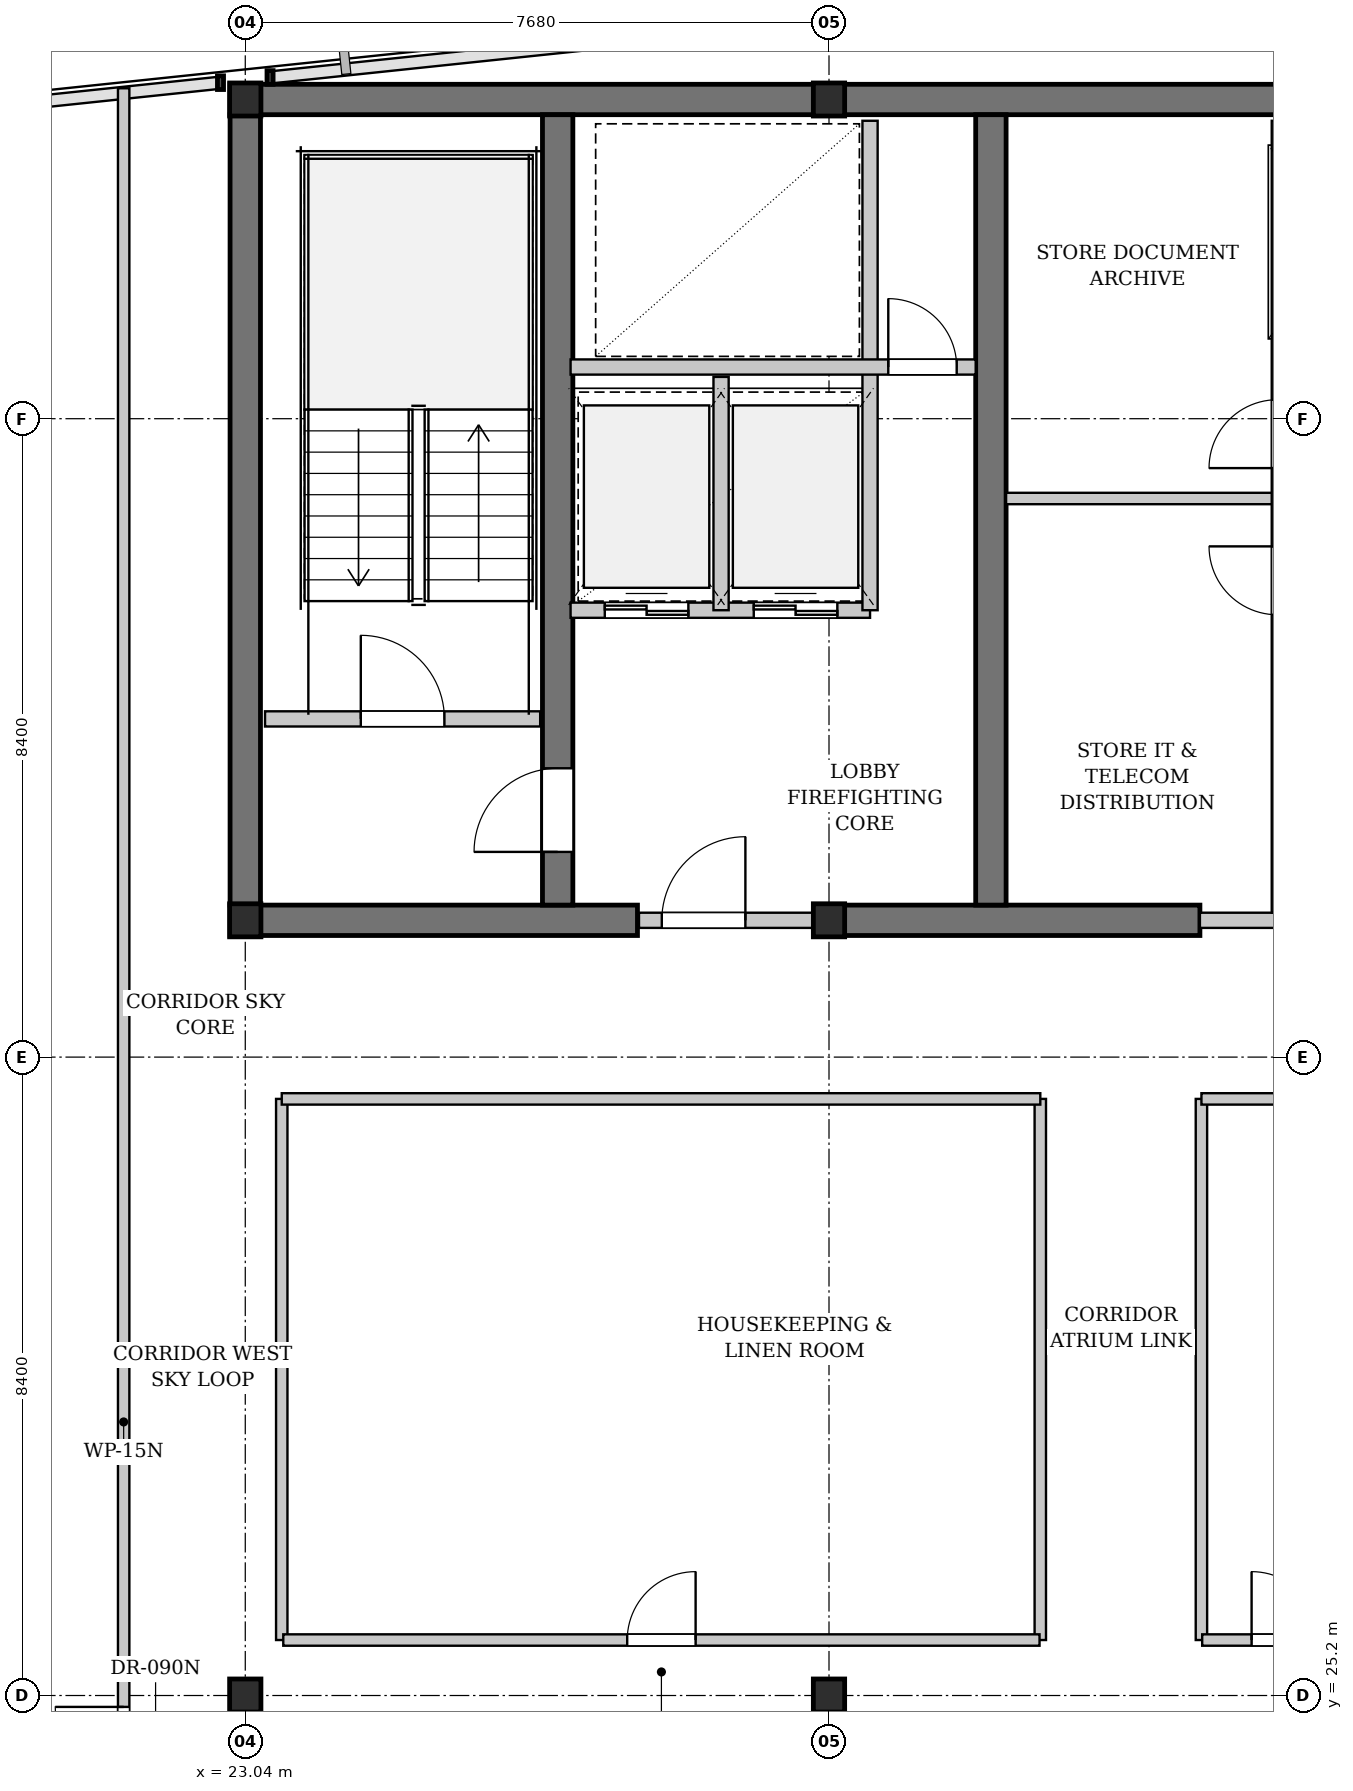
"""IFC4 building model, lengths in metres.
Left out: names, types, materials, properties, quantities, classifications, styles, units other than length and angle.
Written with IfcOpenShell. Run it as: python <this file> out.ifc"""

import sys

from ifc_helpers import new_model, si_unit, direction, frame, frame_2d, origin, origin_2d, place, context, subcontext, project, spatial, rectangle, i_section, extrude, element, fill, save


model = new_model("IFC4")
c1 = context("Model", 3, precision=1e-05, world=origin(), true_north=direction((0.0, 1.0)))
c2 = subcontext(c1, "Body", "Model", "MODEL_VIEW")
j1 = project(units=[si_unit("LENGTHUNIT", "METRE"), si_unit("PLANEANGLEUNIT", "RADIAN")], contexts=[c1])
p1 = place(None, origin())
s1 = spatial("IfcSite", under=j1, at=p1, CompositionType="ELEMENT")
p2 = place(p1, origin())
s2 = spatial("IfcBuilding", under=s1, at=p2, CompositionType="ELEMENT")
p3 = place(p2, frame((0.0, 0.0, 221.0)))
s3 = spatial("IfcBuildingStorey", under=s2, at=p3, CompositionType="ELEMENT", Elevation=221.0)
p4 = place(p3, frame((22.84, 46.2, 0.0), z_axis=(0.0, 0.0, 1.0), x_axis=(1.0, 0.0, 0.0)))
e1 = element("IfcWall", 1, at=p4, inside=s3, PredefinedType="SHEAR", context=c2, shape_type="SweptSolid", body=[
    extrude(rectangle(XDim=31.12, YDim=0.4, at=frame_2d((15.56, 0.0))), origin(), (0.0, 0.0, 1.0), 3.08),
])
p5 = place(p3, frame((22.84, 35.4, 0.0), z_axis=(0.0, 0.0, 1.0), x_axis=(1.0, 0.0, 0.0)))
e2 = element("IfcWall", 2, at=p5, inside=s3, PredefinedType="SHEAR", context=c2, shape_type="SweptSolid", body=[
    extrude(rectangle(XDim=5.36, YDim=0.4, at=frame_2d((2.68, 0.0))), origin(), (0.0, 0.0, 1.0), 3.08),
])
p6 = place(p3, frame((30.72, 35.4, 0.0), z_axis=(0.0, 0.0, 1.0), x_axis=(1.0, 0.0, 0.0)))
e3 = element("IfcWall", 3, at=p6, inside=s3, PredefinedType="SHEAR", context=c2, shape_type="SweptSolid", body=[
    extrude(rectangle(XDim=4.88, YDim=0.4, at=frame_2d((2.44, 0.0))), origin(), (0.0, 0.0, 1.0), 3.08),
])
p7 = place(p3, frame((23.04, 35.6, 0.0), z_axis=(0.0, 0.0, 1.0), x_axis=(0.0, 1.0, 0.0)))
e4 = element("IfcWall", 4, at=p7, inside=s3, PredefinedType="SHEAR", context=c2, shape_type="SweptSolid", body=[
    extrude(rectangle(XDim=10.4, YDim=0.4, at=frame_2d((5.2, 0.0))), origin(), (0.0, 0.0, 1.0), 3.08),
])
p8 = place(p3, frame((27.15, 35.6, 0.0), z_axis=(0.0, 0.0, 1.0), x_axis=(0.0, 1.0, 0.0)))
e5 = element("IfcWall", 5, at=p8, inside=s3, PredefinedType="SHEAR", context=c2, shape_type="SweptSolid", body=[
    extrude(rectangle(XDim=10.4, YDim=0.4, at=frame_2d((5.2, 0.0))), origin(), (0.0, 0.0, 1.0), 3.08),
])
p9 = place(p8, frame((0.7, 0.0, 0.0)))
e6 = element("IfcOpeningElement", 6, at=p9, cuts=e5, PredefinedType="OPENING", context=c2, shape_type="SweptSolid", body=[
    extrude(rectangle(XDim=1.1, YDim=2.15, at=frame_2d((0.55, 1.075))), frame((0.0, 0.21, 0.0), z_axis=(0.0, -1.0, 0.0), x_axis=(1.0, 0.0, 0.0)), (0.0, 0.0, 1.0), 0.42),
])
p10 = place(p3, frame((32.85, 35.6, 0.0), z_axis=(0.0, 0.0, 1.0), x_axis=(0.0, 1.0, 0.0)))
e7 = element("IfcWall", 7, at=p10, inside=s3, PredefinedType="SHEAR", context=c2, shape_type="SweptSolid", body=[
    extrude(rectangle(XDim=10.4, YDim=0.4, at=frame_2d((5.2, 0.0))), origin(), (0.0, 0.0, 1.0), 3.08),
])
for number, where, z_axis, x_axis in (
    (8, (23.04, 35.4, 0.0), (0.0, 0.0, 1.0), (1.0, 0.0, 0.0)),
    (9, (23.04, 46.2, 0.0), (0.0, 0.0, 1.0), (1.0, 0.0, 0.0)),
    (10, (23.04, 25.2, 0.0), (0.0, 0.0, 1.0), (1.0, 0.0, 0.0)),
    (11, (30.72, 35.4, 0.0), (0.0, 0.0, 1.0), (1.0, 0.0, 0.0)),
    (12, (30.72, 46.2, 0.0), (0.0, 0.0, 1.0), (1.0, 0.0, 0.0)),
    (13, (30.72, 25.2, 0.0), (0.0, 0.0, 1.0), (1.0, 0.0, 0.0)),
):
    element("IfcColumn", number, at=place(p3, frame(where, z_axis=z_axis, x_axis=x_axis)), inside=s3, PredefinedType="COLUMN", context=c2, shape_type="SweptSolid", body=[
        extrude(i_section(OverallWidth=0.412, OverallDepth=0.435, WebThickness=0.036, FlangeThickness=0.058, FilletRadius=0.015, at=origin_2d()), origin(), (0.0, 0.0, 1.0), 3.3),
    ])
p11 = place(p3, frame((23.3, 38.05, 0.0), z_axis=(0.0, 0.0, 1.0), x_axis=(1.0, 0.0, 0.0)))
e14 = element("IfcWall", 14, at=p11, inside=s3, PredefinedType="PARTITIONING", context=c2, shape_type="SweptSolid", body=[
    extrude(rectangle(XDim=3.62, YDim=0.2, at=frame_2d((1.81, 0.0))), origin(), (0.0, 0.0, 1.0), 3.08),
])
p12 = place(p11, frame((1.26, 0.0, 0.0)))
e15 = element("IfcOpeningElement", 15, at=p12, cuts=e14, PredefinedType="OPENING", context=c2, shape_type="SweptSolid", body=[
    extrude(rectangle(XDim=1.1, YDim=2.15, at=frame_2d((0.55, 1.075))), frame((0.0, 0.11, 0.0), z_axis=(0.0, -1.0, 0.0), x_axis=(1.0, 0.0, 0.0)), (0.0, 0.0, 1.0), 0.22),
])
p13 = place(p3, frame((28.22, 35.4, 0.0), z_axis=(0.0, 0.0, 1.0), x_axis=(1.0, 0.0, 0.0)))
e16 = element("IfcWall", 16, at=p13, inside=s3, PredefinedType="PARTITIONING", context=c2, shape_type="SweptSolid", body=[
    extrude(rectangle(XDim=2.5, YDim=0.2, at=frame_2d((1.25, 0.0))), origin(), (0.0, 0.0, 1.0), 2.313),
])
p14 = place(p13, frame((0.3, 0.0, 0.0)))
e17 = element("IfcOpeningElement", 17, at=p14, cuts=e16, PredefinedType="OPENING", context=c2, shape_type="SweptSolid", body=[
    extrude(rectangle(XDim=1.1, YDim=2.15, at=frame_2d((0.55, 1.075))), frame((0.0, 0.11, 0.0), z_axis=(0.0, -1.0, 0.0), x_axis=(1.0, 0.0, 0.0)), (0.0, 0.0, 1.0), 0.22),
])
p15 = place(p3, frame((27.32, 39.48, 0.0), z_axis=(0.0, 0.0, 1.0), x_axis=(1.0, 0.0, 0.0)))
e18 = element("IfcWall", 18, at=p15, inside=s3, PredefinedType="PARTITIONING", context=c2, shape_type="SweptSolid", body=[
    extrude(rectangle(XDim=3.94, YDim=0.2, at=frame_2d((1.97, 0.0))), origin(), (0.0, 0.0, 1.0), 3.08),
])
p16 = place(p15, frame((0.45, 0.0, 0.0)))
e19 = element("IfcOpeningElement", 19, at=p16, cuts=e18, PredefinedType="OPENING", context=c2, shape_type="SweptSolid", body=[
    extrude(rectangle(XDim=1.1, YDim=2.2, at=frame_2d((0.55, 1.1))), frame((0.0, 0.11, 0.0), z_axis=(0.0, -1.0, 0.0), x_axis=(1.0, 0.0, 0.0)), (0.0, 0.0, 1.0), 0.22),
])
p17 = place(p15, frame((2.41, 0.0, 0.0)))
e20 = element("IfcOpeningElement", 20, at=p17, cuts=e18, PredefinedType="OPENING", context=c2, shape_type="SweptSolid", body=[
    extrude(rectangle(XDim=1.1, YDim=2.2, at=frame_2d((0.55, 1.1))), frame((0.0, 0.11, 0.0), z_axis=(0.0, -1.0, 0.0), x_axis=(1.0, 0.0, 0.0)), (0.0, 0.0, 1.0), 0.22),
])
p18 = place(p3, frame((29.3, 39.48, 0.0), z_axis=(0.0, 0.0, 1.0), x_axis=(0.0, 1.0, 0.0)))
e21 = element("IfcWall", 21, at=p18, inside=s3, PredefinedType="PARTITIONING", context=c2, shape_type="SweptSolid", body=[
    extrude(rectangle(XDim=3.07, YDim=0.2, at=frame_2d((1.535, 0.0))), origin(), (0.0, 0.0, 1.0), 3.08),
])
p19 = place(p3, frame((31.26, 39.48, 0.0), z_axis=(0.0, 0.0, 1.0), x_axis=(0.0, 1.0, 0.0)))
e22 = element("IfcWall", 22, at=p19, inside=s3, PredefinedType="PARTITIONING", context=c2, shape_type="SweptSolid", body=[
    extrude(rectangle(XDim=6.44, YDim=0.2, at=frame_2d((3.22, 0.0))), origin(), (0.0, 0.0, 1.0), 3.08),
])
p20 = place(p3, frame((27.32, 42.68, 0.0), z_axis=(0.0, 0.0, 1.0), x_axis=(1.0, 0.0, 0.0)))
e23 = element("IfcWall", 23, at=p20, inside=s3, PredefinedType="PARTITIONING", context=c2, shape_type="SweptSolid", body=[
    extrude(rectangle(XDim=5.33, YDim=0.2, at=frame_2d((2.665, 0.0))), origin(), (0.0, 0.0, 1.0), 3.08),
])
p21 = place(p20, frame((4.18, 0.0, 0.0)))
e24 = element("IfcOpeningElement", 24, at=p21, cuts=e23, PredefinedType="OPENING", context=c2, shape_type="SweptSolid", body=[
    extrude(rectangle(XDim=0.9, YDim=2.15, at=frame_2d((0.45, 1.075))), frame((0.0, 0.11, 0.0), z_axis=(0.0, -1.0, 0.0), x_axis=(1.0, 0.0, 0.0)), (0.0, 0.0, 1.0), 0.22),
])
p22 = place(p3, frame((35.6, 35.4, 0.0), z_axis=(0.0, 0.0, 1.0), x_axis=(1.0, 0.0, 0.0)))
e25 = element("IfcWall", 25, at=p22, inside=s3, PredefinedType="PARTITIONING", context=c2, shape_type="SweptSolid", body=[
    extrude(rectangle(XDim=6.5, YDim=0.2, at=frame_2d((3.25, 0.0))), origin(), (0.0, 0.0, 1.0), 2.313),
])
p23 = place(p22, frame((3.8, 0.0, 0.0)))
e26 = element("IfcOpeningElement", 26, at=p23, cuts=e25, PredefinedType="OPENING", context=c2, shape_type="SweptSolid", body=[
    extrude(rectangle(XDim=1.8, YDim=2.3, at=frame_2d((0.9, 1.15))), frame((0.0, 0.11, 0.0), z_axis=(0.0, -1.0, 0.0), x_axis=(1.0, 0.0, 0.0)), (0.0, 0.0, 1.0), 0.22),
])
p24 = place(p3, frame((33.05, 40.95, 0.0), z_axis=(0.0, 0.0, 1.0), x_axis=(1.0, 0.0, 0.0)))
e27 = element("IfcWall", 27, at=p24, inside=s3, PredefinedType="PARTITIONING", context=c2, shape_type="SweptSolid", body=[
    extrude(rectangle(XDim=3.57, YDim=0.15, at=frame_2d((1.785, 0.0))), origin(), (0.0, 0.0, 1.0), 3.08),
])
p25 = place(p3, frame((36.62, 35.5, 0.0), z_axis=(0.0, 0.0, 1.0), x_axis=(0.0, 1.0, 0.0)))
e28 = element("IfcWall", 28, at=p25, inside=s3, PredefinedType="PARTITIONING", context=c2, shape_type="SweptSolid", body=[
    extrude(rectangle(XDim=10.42, YDim=0.15, at=frame_2d((5.21, 0.0))), origin(), (0.0, 0.0, 1.0), 3.08),
])
p26 = place(p25, frame((3.92, 0.0, 0.0)))
e29 = element("IfcOpeningElement", 29, at=p26, cuts=e28, PredefinedType="OPENING", context=c2, shape_type="SweptSolid", body=[
    extrude(rectangle(XDim=0.9, YDim=2.15, at=frame_2d((0.45, 1.075))), frame((0.0, 0.085, 0.0), z_axis=(0.0, -1.0, 0.0), x_axis=(1.0, 0.0, 0.0)), (0.0, 0.0, 1.0), 0.17),
])
p27 = place(p25, frame((5.85, 0.0, 0.0)))
e30 = element("IfcOpeningElement", 30, at=p27, cuts=e28, PredefinedType="OPENING", context=c2, shape_type="SweptSolid", body=[
    extrude(rectangle(XDim=0.9, YDim=2.15, at=frame_2d((0.45, 1.075))), frame((0.0, 0.085, 0.0), z_axis=(0.0, -1.0, 0.0), x_axis=(1.0, 0.0, 0.0)), (0.0, 0.0, 1.0), 0.17),
])
p28 = place(p3, frame((21.44, 23.85, 0.0), z_axis=(0.0, 0.0, 1.0), x_axis=(0.0, 1.0, 0.0)))
e31 = element("IfcWall", 31, at=p28, inside=s3, PredefinedType="PARTITIONING", context=c2, shape_type="SweptSolid", body=[
    extrude(rectangle(XDim=22.498, YDim=0.15, at=frame_2d((11.249, 0.0))), origin(), (0.0, 0.0, 1.0), 3.08),
])
p29 = place(p28, frame((0.3, 0.0, 0.0)))
e32 = element("IfcOpeningElement", 32, at=p29, cuts=e31, PredefinedType="OPENING", context=c2, shape_type="SweptSolid", body=[
    extrude(rectangle(XDim=0.9, YDim=2.15, at=frame_2d((0.45, 1.075))), frame((0.0, 0.085, 0.0), z_axis=(0.0, -1.0, 0.0), x_axis=(1.0, 0.0, 0.0)), (0.0, 0.0, 1.0), 0.17),
])
for number, where, z_axis, x_axis in (
    (33, (23.52, 25.93, 0.0), (0.0, 0.0, 1.0), (0.0, 1.0, 0.0)),
    (34, (33.5, 25.93, 0.0), (0.0, 0.0, 1.0), (0.0, 1.0, 0.0)),
    (35, (35.62, 25.93, 0.0), (0.0, 0.0, 1.0), (0.0, 1.0, 0.0)),
):
    element("IfcWall", number, at=place(p3, frame(where, z_axis=z_axis, x_axis=x_axis)), inside=s3, PredefinedType="PARTITIONING", context=c2, shape_type="SweptSolid", body=[
        extrude(rectangle(XDim=7.12, YDim=0.15, at=frame_2d((3.56, 0.0))), origin(), (0.0, 0.0, 1.0), 3.08),
    ])
p30 = place(p3, frame((23.52, 33.05, 0.0), z_axis=(0.0, 0.0, 1.0), x_axis=(1.0, 0.0, 0.0)))
e36 = element("IfcWall", 36, at=p30, inside=s3, PredefinedType="PARTITIONING", context=c2, shape_type="SweptSolid", body=[
    extrude(rectangle(XDim=9.98, YDim=0.15, at=frame_2d((4.99, 0.0))), origin(), (0.0, 0.0, 1.0), 3.08),
])
p31 = place(p3, frame((35.62, 33.05, 0.0), z_axis=(0.0, 0.0, 1.0), x_axis=(1.0, 0.0, 0.0)))
e37 = element("IfcWall", 37, at=p31, inside=s3, PredefinedType="PARTITIONING", context=c2, shape_type="SweptSolid", body=[
    extrude(rectangle(XDim=14.46, YDim=0.15, at=frame_2d((7.23, 0.0))), origin(), (0.0, 0.0, 1.0), 3.08),
])
p32 = place(p3, frame((23.54, 25.93, 0.0), z_axis=(0.0, 0.0, 1.0), x_axis=(1.0, 0.0, 0.0)))
e38 = element("IfcWall", 38, at=p32, inside=s3, PredefinedType="PARTITIONING", context=c2, shape_type="SweptSolid", body=[
    extrude(rectangle(XDim=9.95, YDim=0.15, at=frame_2d((4.975, 0.0))), origin(), (0.0, 0.0, 1.0), 3.08),
])
p33 = place(p32, frame((4.525, 0.0, 0.0)))
e39 = element("IfcOpeningElement", 39, at=p33, cuts=e38, PredefinedType="OPENING", context=c2, shape_type="SweptSolid", body=[
    extrude(rectangle(XDim=0.9, YDim=2.15, at=frame_2d((0.45, 1.075))), frame((0.0, 0.085, 0.0), z_axis=(0.0, -1.0, 0.0), x_axis=(1.0, 0.0, 0.0)), (0.0, 0.0, 1.0), 0.17),
])
p34 = place(p3, frame((35.63, 25.93, 0.0), z_axis=(0.0, 0.0, 1.0), x_axis=(1.0, 0.0, 0.0)))
e40 = element("IfcWall", 40, at=p34, inside=s3, PredefinedType="PARTITIONING", context=c2, shape_type="SweptSolid", body=[
    extrude(rectangle(XDim=14.43, YDim=0.15, at=frame_2d((7.215, 0.0))), origin(), (0.0, 0.0, 1.0), 3.08),
])
p35 = place(p34, frame((0.65, 0.0, 0.0)))
e41 = element("IfcOpeningElement", 41, at=p35, cuts=e40, PredefinedType="OPENING", context=c2, shape_type="SweptSolid", body=[
    extrude(rectangle(XDim=0.9, YDim=2.15, at=frame_2d((0.45, 1.075))), frame((0.0, 0.085, 0.0), z_axis=(0.0, -1.0, 0.0), x_axis=(1.0, 0.0, 0.0)), (0.0, 0.0, 1.0), 0.17),
])
p36 = place(p34, frame((8.031, 0.0, 0.0)))
e42 = element("IfcOpeningElement", 42, at=p36, cuts=e40, PredefinedType="OPENING", context=c2, shape_type="SweptSolid", body=[
    extrude(rectangle(XDim=0.9, YDim=2.15, at=frame_2d((0.45, 1.075))), frame((0.0, 0.085, 0.0), z_axis=(0.0, -1.0, 0.0), x_axis=(1.0, 0.0, 0.0)), (0.0, 0.0, 1.0), 0.17),
])
p37 = place(p12, origin())
e43 = element("IfcDoor", 43, at=p37, inside=s3, OperationType="SINGLE_SWING_LEFT", PredefinedType="DOOR", context=c2, shape_type="SweptSolid", body=[
    extrude(rectangle(XDim=1.1, YDim=2.15, at=frame_2d((0.55, 1.075))), frame((0.0, 0.025, 0.0), z_axis=(0.0, -1.0, 0.0), x_axis=(1.0, 0.0, 0.0)), (0.0, 0.0, 1.0), 0.05),
])
fill(e15, e43)
p38 = place(p14, origin())
e44 = element("IfcDoor", 44, at=p38, inside=s3, OperationType="SINGLE_SWING_RIGHT", PredefinedType="DOOR", context=c2, shape_type="SweptSolid", body=[
    extrude(rectangle(XDim=1.1, YDim=2.15, at=frame_2d((0.55, 1.075))), frame((0.0, 0.025, 0.0), z_axis=(0.0, -1.0, 0.0), x_axis=(1.0, 0.0, 0.0)), (0.0, 0.0, 1.0), 0.05),
])
fill(e17, e44)
p39 = place(p16, origin())
e45 = element("IfcDoor", 45, at=p39, inside=s3, OperationType="DOUBLE_DOOR_SLIDING", PredefinedType="DOOR", context=c2, shape_type="SweptSolid", body=[
    extrude(rectangle(XDim=1.1, YDim=2.2, at=frame_2d((0.55, 1.1))), frame((0.0, 0.025, 0.0), z_axis=(0.0, -1.0, 0.0), x_axis=(1.0, 0.0, 0.0)), (0.0, 0.0, 1.0), 0.05),
])
fill(e19, e45)
p40 = place(p17, origin())
e46 = element("IfcDoor", 46, at=p40, inside=s3, OperationType="DOUBLE_DOOR_SLIDING", PredefinedType="DOOR", context=c2, shape_type="SweptSolid", body=[
    extrude(rectangle(XDim=1.1, YDim=2.2, at=frame_2d((0.55, 1.1))), frame((0.0, 0.025, 0.0), z_axis=(0.0, -1.0, 0.0), x_axis=(1.0, 0.0, 0.0)), (0.0, 0.0, 1.0), 0.05),
])
fill(e20, e46)
p41 = place(p21, origin())
e47 = element("IfcDoor", 47, at=p41, inside=s3, OperationType="SINGLE_SWING_LEFT", PredefinedType="DOOR", context=c2, shape_type="SweptSolid", body=[
    extrude(rectangle(XDim=0.9, YDim=2.15, at=frame_2d((0.45, 1.075))), frame((0.0, 0.025, 0.0), z_axis=(0.0, -1.0, 0.0), x_axis=(1.0, 0.0, 0.0)), (0.0, 0.0, 1.0), 0.05),
])
fill(e24, e47)
p42 = place(p29, origin())
e48 = element("IfcDoor", 48, at=p42, inside=s3, OperationType="SINGLE_SWING_RIGHT", PredefinedType="DOOR", context=c2, shape_type="SweptSolid", body=[
    extrude(rectangle(XDim=0.9, YDim=2.15, at=frame_2d((0.45, 1.075))), frame((0.0, 0.025, 0.0), z_axis=(0.0, -1.0, 0.0), x_axis=(1.0, 0.0, 0.0)), (0.0, 0.0, 1.0), 0.05),
])
fill(e32, e48)
p43 = place(p33, origin())
e49 = element("IfcDoor", 49, at=p43, inside=s3, OperationType="SINGLE_SWING_RIGHT", PredefinedType="DOOR", context=c2, shape_type="SweptSolid", body=[
    extrude(rectangle(XDim=0.9, YDim=2.15, at=frame_2d((0.45, 1.075))), frame((0.0, 0.025, 0.0), z_axis=(0.0, -1.0, 0.0), x_axis=(1.0, 0.0, 0.0)), (0.0, 0.0, 1.0), 0.05),
])
fill(e39, e49)
p44 = place(p35, origin())
e50 = element("IfcDoor", 50, at=p44, inside=s3, OperationType="SINGLE_SWING_LEFT", PredefinedType="DOOR", context=c2, shape_type="SweptSolid", body=[
    extrude(rectangle(XDim=0.9, YDim=2.15, at=frame_2d((0.45, 1.075))), frame((0.0, 0.025, 0.0), z_axis=(0.0, -1.0, 0.0), x_axis=(1.0, 0.0, 0.0)), (0.0, 0.0, 1.0), 0.05),
])
fill(e41, e50)
p45 = place(p9, origin())
e51 = element("IfcDoor", 51, at=p45, inside=s3, OperationType="SINGLE_SWING_LEFT", PredefinedType="DOOR", context=c2, shape_type="SweptSolid", body=[
    extrude(rectangle(XDim=1.1, YDim=2.15, at=frame_2d((0.55, 1.075))), frame((0.0, 0.025, 0.0), z_axis=(0.0, -1.0, 0.0), x_axis=(1.0, 0.0, 0.0)), (0.0, 0.0, 1.0), 0.05),
])
fill(e6, e51)
save(model, sys.argv[1])
